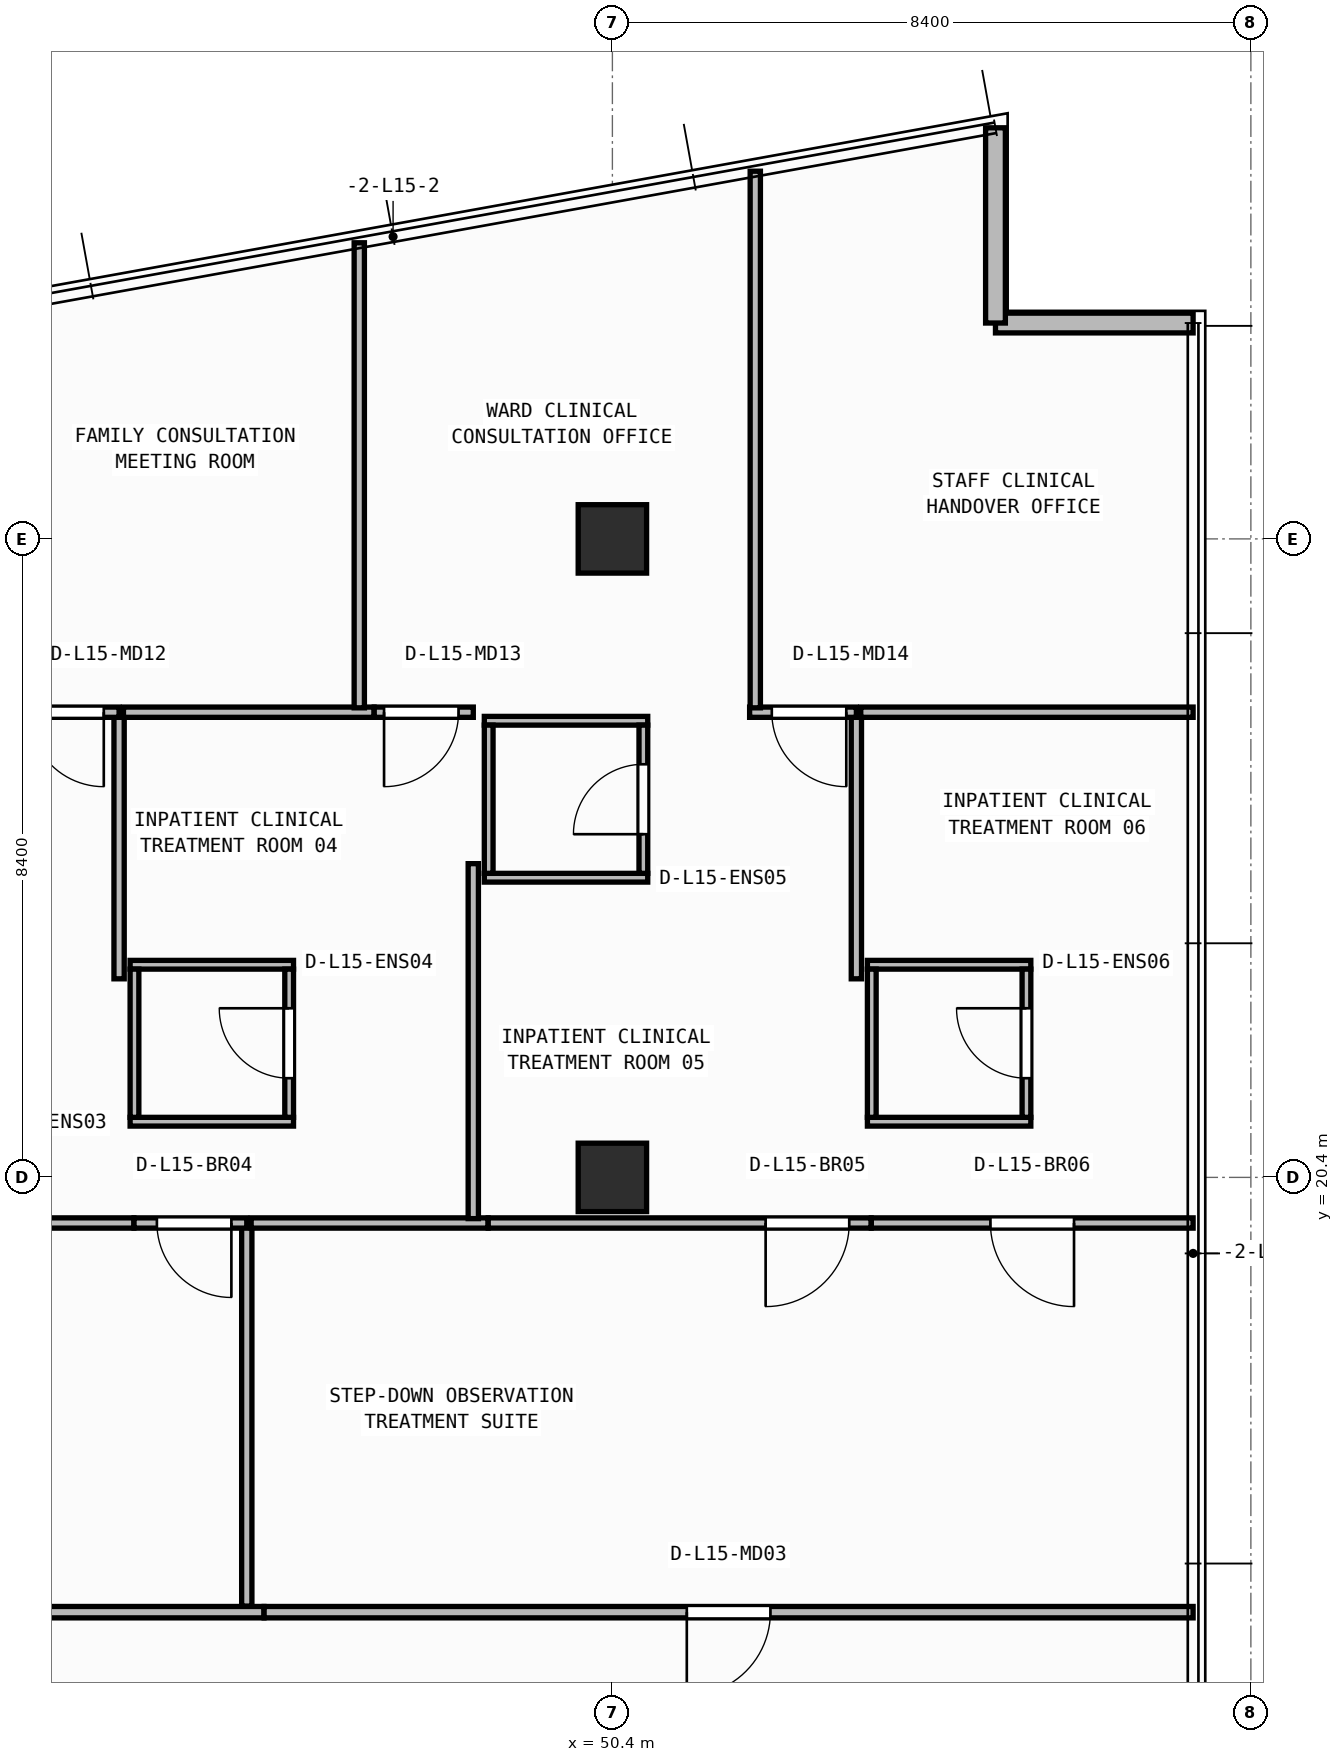
"""IFC4 building model, lengths in metres.
Left out: names, types, materials, properties, quantities, classifications, styles, units other than length and angle.
Written with IfcOpenShell. Run it as: python <this file> out.ifc"""

import sys

from ifc_helpers import new_model, si_unit, direction, frame, frame_2d, origin, origin_2d, place, context, subcontext, project, spatial, rectangle, extrude, element, fill, save


model = new_model("IFC4")
c1 = context("Model", 3, precision=1e-05, world=origin(), true_north=direction((0.0, 1.0)))
c2 = subcontext(c1, "Body", "Model", "MODEL_VIEW")
j1 = project(units=[si_unit("LENGTHUNIT", "METRE"), si_unit("PLANEANGLEUNIT", "RADIAN")], contexts=[c1])
p1 = place(None, origin())
s1 = spatial("IfcSite", under=j1, at=p1, CompositionType="ELEMENT")
p2 = place(p1, origin())
s2 = spatial("IfcBuilding", under=s1, at=p2, CompositionType="ELEMENT")
p3 = place(p2, frame((0.0, 0.0, 62.0)))
s3 = spatial("IfcBuildingStorey", under=s2, at=p3, CompositionType="ELEMENT", Elevation=62.0)
for number, where, z_axis, x_axis in (
    (1, (50.4, 20.4, 0.0), (0.0, 0.0, 1.0), (1.0, 0.0, 0.0)),
    (2, (50.4, 28.8, 0.0), (0.0, 0.0, 1.0), (1.0, 0.0, 0.0)),
):
    element("IfcColumn", number, at=place(p3, frame(where, z_axis=z_axis, x_axis=x_axis)), inside=s3, PredefinedType="COLUMN", context=c2, shape_type="SweptSolid", body=[
        extrude(rectangle(XDim=0.9, YDim=0.9, at=origin_2d()), origin(), (0.0, 0.0, 1.0), 3.95),
    ])
p4 = place(p3, frame((58.04, 31.64, 0.0), z_axis=(0.0, 0.0, 1.0), x_axis=(-1.0, 0.0, 0.0)))
e3 = element("IfcWall", 3, at=p4, inside=s3, PredefinedType="STANDARD", context=c2, shape_type="SweptSolid", body=[
    extrude(rectangle(XDim=2.6, YDim=0.26, at=frame_2d((1.3, 0.0))), origin(), (0.0, 0.0, 1.0), 3.71),
])
p5 = place(p3, frame((55.44, 31.64, 0.0), z_axis=(0.0, 0.0, 1.0), x_axis=(0.0, 1.0, 0.0)))
e4 = element("IfcWall", 4, at=p5, inside=s3, PredefinedType="STANDARD", context=c2, shape_type="SweptSolid", body=[
    extrude(rectangle(XDim=2.569, YDim=0.26, at=frame_2d((1.284, 0.0))), origin(), (0.0, 0.0, 1.0), 3.71),
])
for number, where, z_axis, x_axis in (
    (5, (44.055, 21.133, 0.0), (0.0, 0.0, 1.0), (1.0, 0.0, 0.0)),
    (6, (44.055, 23.198, 0.0), (0.0, 0.0, 1.0), (1.0, 0.0, 0.0)),
):
    element("IfcWall", number, at=place(p3, frame(where, z_axis=z_axis, x_axis=x_axis)), inside=s3, PredefinedType="PARTITIONING", context=c2, shape_type="SweptSolid", body=[
        extrude(rectangle(XDim=2.15, YDim=0.115, at=frame_2d((1.075, 0.0))), origin(), (0.0, 0.0, 1.0), 3.71),
    ])
p6 = place(p3, frame((44.113, 21.19, 0.0), z_axis=(0.0, 0.0, 1.0), x_axis=(0.0, 1.0, 0.0)))
e7 = element("IfcWall", 7, at=p6, inside=s3, PredefinedType="PARTITIONING", context=c2, shape_type="SweptSolid", body=[
    extrude(rectangle(XDim=1.95, YDim=0.115, at=frame_2d((0.975, 0.0))), origin(), (0.0, 0.0, 1.0), 3.71),
])
p7 = place(p3, frame((46.147, 21.19, 0.0), z_axis=(0.0, 0.0, 1.0), x_axis=(0.0, 1.0, 0.0)))
e8 = element("IfcWall", 8, at=p7, inside=s3, PredefinedType="PARTITIONING", context=c2, shape_type="SweptSolid", body=[
    extrude(rectangle(XDim=1.95, YDim=0.115, at=frame_2d((0.975, 0.0))), origin(), (0.0, 0.0, 1.0), 3.71),
])
p8 = place(p7, frame((0.515, 0.0, 0.0)))
e9 = element("IfcOpeningElement", 9, at=p8, cuts=e8, PredefinedType="OPENING", context=c2, shape_type="SweptSolid", body=[
    extrude(rectangle(XDim=0.92, YDim=2.1, at=frame_2d((0.46, 1.05))), frame((0.0, 0.067, 0.0), z_axis=(0.0, -1.0, 0.0), x_axis=(1.0, 0.0, 0.0)), (0.0, 0.0, 1.0), 0.135),
])
p9 = place(p3, frame((48.715, 24.343, 0.0), z_axis=(0.0, 0.0, 1.0), x_axis=(1.0, 0.0, 0.0)))
e10 = element("IfcWall", 10, at=p9, inside=s3, PredefinedType="PARTITIONING", context=c2, shape_type="SweptSolid", body=[
    extrude(rectangle(XDim=2.15, YDim=0.115, at=frame_2d((1.075, 0.0))), origin(), (0.0, 0.0, 1.0), 3.381),
])
p10 = place(p3, frame((48.715, 26.407, 0.0), z_axis=(0.0, 0.0, 1.0), x_axis=(1.0, 0.0, 0.0)))
e11 = element("IfcWall", 11, at=p10, inside=s3, PredefinedType="PARTITIONING", context=c2, shape_type="SweptSolid", body=[
    extrude(rectangle(XDim=2.15, YDim=0.115, at=frame_2d((1.075, 0.0))), origin(), (0.0, 0.0, 1.0), 3.71),
])
p11 = place(p3, frame((48.772, 24.4, 0.0), z_axis=(0.0, 0.0, 1.0), x_axis=(0.0, 1.0, 0.0)))
e12 = element("IfcWall", 12, at=p11, inside=s3, PredefinedType="PARTITIONING", context=c2, shape_type="SweptSolid", body=[
    extrude(rectangle(XDim=1.95, YDim=0.115, at=frame_2d((0.975, 0.0))), origin(), (0.0, 0.0, 1.0), 3.71),
])
p12 = place(p3, frame((50.808, 24.4, 0.0), z_axis=(0.0, 0.0, 1.0), x_axis=(0.0, 1.0, 0.0)))
e13 = element("IfcWall", 13, at=p12, inside=s3, PredefinedType="PARTITIONING", context=c2, shape_type="SweptSolid", body=[
    extrude(rectangle(XDim=1.95, YDim=0.115, at=frame_2d((0.975, 0.0))), origin(), (0.0, 0.0, 1.0), 3.073),
])
p13 = place(p12, frame((0.515, 0.0, 0.0)))
e14 = element("IfcOpeningElement", 14, at=p13, cuts=e13, PredefinedType="OPENING", context=c2, shape_type="SweptSolid", body=[
    extrude(rectangle(XDim=0.92, YDim=2.1, at=frame_2d((0.46, 1.05))), frame((0.0, 0.067, 0.0), z_axis=(0.0, -1.0, 0.0), x_axis=(1.0, 0.0, 0.0)), (0.0, 0.0, 1.0), 0.135),
])
for number, where, z_axis, x_axis in (
    (15, (53.755, 21.133, 0.0), (0.0, 0.0, 1.0), (1.0, 0.0, 0.0)),
    (16, (53.755, 23.198, 0.0), (0.0, 0.0, 1.0), (1.0, 0.0, 0.0)),
):
    element("IfcWall", number, at=place(p3, frame(where, z_axis=z_axis, x_axis=x_axis)), inside=s3, PredefinedType="PARTITIONING", context=c2, shape_type="SweptSolid", body=[
        extrude(rectangle(XDim=2.15, YDim=0.115, at=frame_2d((1.075, 0.0))), origin(), (0.0, 0.0, 1.0), 3.71),
    ])
p14 = place(p3, frame((53.812, 21.19, 0.0), z_axis=(0.0, 0.0, 1.0), x_axis=(0.0, 1.0, 0.0)))
e17 = element("IfcWall", 17, at=p14, inside=s3, PredefinedType="PARTITIONING", context=c2, shape_type="SweptSolid", body=[
    extrude(rectangle(XDim=1.95, YDim=0.115, at=frame_2d((0.975, 0.0))), origin(), (0.0, 0.0, 1.0), 3.71),
])
p15 = place(p3, frame((55.847, 21.19, 0.0), z_axis=(0.0, 0.0, 1.0), x_axis=(0.0, 1.0, 0.0)))
e18 = element("IfcWall", 18, at=p15, inside=s3, PredefinedType="PARTITIONING", context=c2, shape_type="SweptSolid", body=[
    extrude(rectangle(XDim=1.95, YDim=0.115, at=frame_2d((0.975, 0.0))), origin(), (0.0, 0.0, 1.0), 3.71),
])
p16 = place(p15, frame((0.515, 0.0, 0.0)))
e19 = element("IfcOpeningElement", 19, at=p16, cuts=e18, PredefinedType="OPENING", context=c2, shape_type="SweptSolid", body=[
    extrude(rectangle(XDim=0.92, YDim=2.1, at=frame_2d((0.46, 1.05))), frame((0.0, 0.067, 0.0), z_axis=(0.0, -1.0, 0.0), x_axis=(1.0, 0.0, 0.0)), (0.0, 0.0, 1.0), 0.135),
])
p17 = place(p3, frame((45.816, 14.68, 0.0), z_axis=(0.0, 0.0, 1.0), x_axis=(-1.0, 0.0, 0.0)))
e20 = element("IfcWall", 20, at=p17, inside=s3, PredefinedType="PARTITIONING", context=c2, shape_type="SweptSolid", body=[
    extrude(rectangle(XDim=16.062, YDim=0.15, at=frame_2d((8.031, 0.0))), origin(), (0.0, 0.0, 1.0), 3.71),
])
p18 = place(p17, frame((7.481, 0.0, 0.0)))
e21 = element("IfcOpeningElement", 21, at=p18, cuts=e20, PredefinedType="OPENING", context=c2, shape_type="SweptSolid", body=[
    extrude(rectangle(XDim=1.1, YDim=2.1, at=frame_2d((0.55, 1.05))), frame((0.0, 0.085, 0.0), z_axis=(0.0, -1.0, 0.0), x_axis=(1.0, 0.0, 0.0)), (0.0, 0.0, 1.0), 0.17),
])
p19 = place(p3, frame((58.04, 14.68, 0.0), z_axis=(0.0, 0.0, 1.0), x_axis=(-1.0, 0.0, 0.0)))
e22 = element("IfcWall", 22, at=p19, inside=s3, PredefinedType="PARTITIONING", context=c2, shape_type="SweptSolid", body=[
    extrude(rectangle(XDim=12.222, YDim=0.15, at=frame_2d((6.111, 0.0))), origin(), (0.0, 0.0, 1.0), 3.71),
])
p20 = place(p19, frame((5.561, 0.0, 0.0)))
e23 = element("IfcOpeningElement", 23, at=p20, cuts=e22, PredefinedType="OPENING", context=c2, shape_type="SweptSolid", body=[
    extrude(rectangle(XDim=1.1, YDim=2.1, at=frame_2d((0.55, 1.05))), frame((0.0, 0.085, 0.0), z_axis=(0.0, -1.0, 0.0), x_axis=(1.0, 0.0, 0.0)), (0.0, 0.0, 1.0), 0.17),
])
p21 = place(p3, frame((45.59, 14.76, 0.0), z_axis=(0.0, 0.0, 1.0), x_axis=(0.0, 1.0, 0.0)))
e24 = element("IfcWall", 24, at=p21, inside=s3, PredefinedType="PARTITIONING", context=c2, shape_type="SweptSolid", body=[
    extrude(rectangle(XDim=5.04, YDim=0.135, at=frame_2d((2.52, 0.0))), origin(), (0.0, 0.0, 1.0), 3.71),
])
p22 = place(p3, frame((44.104, 19.8, 0.0), z_axis=(0.0, 0.0, 1.0), x_axis=(-1.0, 0.0, 0.0)))
e25 = element("IfcWall", 25, at=p22, inside=s3, PredefinedType="PARTITIONING", context=c2, shape_type="SweptSolid", body=[
    extrude(rectangle(XDim=4.288, YDim=0.135, at=frame_2d((2.144, 0.0))), origin(), (0.0, 0.0, 1.0), 3.71),
])
p23 = place(p3, frame((45.59, 19.8, 0.0), z_axis=(0.0, 0.0, 1.0), x_axis=(-1.0, 0.0, 0.0)))
e26 = element("IfcWall", 26, at=p23, inside=s3, PredefinedType="PARTITIONING", context=c2, shape_type="SweptSolid", body=[
    extrude(rectangle(XDim=1.483, YDim=0.135, at=frame_2d((0.742, 0.0))), origin(), (0.0, 0.0, 1.0), 3.71),
])
p24 = place(p23, frame((0.203, 0.0, 0.0)))
e27 = element("IfcOpeningElement", 27, at=p24, cuts=e26, PredefinedType="OPENING", context=c2, shape_type="SweptSolid", body=[
    extrude(rectangle(XDim=0.98, YDim=2.1, at=frame_2d((0.49, 1.05))), frame((0.0, 0.077, 0.0), z_axis=(0.0, -1.0, 0.0), x_axis=(1.0, 0.0, 0.0)), (0.0, 0.0, 1.0), 0.155),
])
p25 = place(p3, frame((48.765, 19.8, 0.0), z_axis=(0.0, 0.0, 1.0), x_axis=(-1.0, 0.0, 0.0)))
e28 = element("IfcWall", 28, at=p25, inside=s3, PredefinedType="PARTITIONING", context=c2, shape_type="SweptSolid", body=[
    extrude(rectangle(XDim=3.117, YDim=0.135, at=frame_2d((1.559, 0.0))), origin(), (0.0, 0.0, 1.0), 3.71),
])
p26 = place(p3, frame((53.805, 19.8, 0.0), z_axis=(0.0, 0.0, 1.0), x_axis=(-1.0, 0.0, 0.0)))
e29 = element("IfcWall", 29, at=p26, inside=s3, PredefinedType="PARTITIONING", context=c2, shape_type="SweptSolid", body=[
    extrude(rectangle(XDim=5.038, YDim=0.135, at=frame_2d((2.519, 0.0))), origin(), (0.0, 0.0, 1.0), 3.71),
])
p27 = place(p26, frame((0.289, 0.0, 0.0)))
e30 = element("IfcOpeningElement", 30, at=p27, cuts=e29, PredefinedType="OPENING", context=c2, shape_type="SweptSolid", body=[
    extrude(rectangle(XDim=1.1, YDim=2.1, at=frame_2d((0.55, 1.05))), frame((0.0, 0.077, 0.0), z_axis=(0.0, -1.0, 0.0), x_axis=(1.0, 0.0, 0.0)), (0.0, 0.0, 1.0), 0.155),
])
p28 = place(p3, frame((58.04, 19.8, 0.0), z_axis=(0.0, 0.0, 1.0), x_axis=(-1.0, 0.0, 0.0)))
e31 = element("IfcWall", 31, at=p28, inside=s3, PredefinedType="PARTITIONING", context=c2, shape_type="SweptSolid", body=[
    extrude(rectangle(XDim=4.233, YDim=0.135, at=frame_2d((2.117, 0.0))), origin(), (0.0, 0.0, 1.0), 3.71),
])
p29 = place(p28, frame((1.567, 0.0, 0.0)))
e32 = element("IfcOpeningElement", 32, at=p29, cuts=e31, PredefinedType="OPENING", context=c2, shape_type="SweptSolid", body=[
    extrude(rectangle(XDim=1.1, YDim=2.1, at=frame_2d((0.55, 1.05))), frame((0.0, 0.077, 0.0), z_axis=(0.0, -1.0, 0.0), x_axis=(1.0, 0.0, 0.0)), (0.0, 0.0, 1.0), 0.155),
])
p30 = place(p3, frame((43.91, 23.012, 0.0), z_axis=(0.0, 0.0, 1.0), x_axis=(0.0, 1.0, 0.0)))
e33 = element("IfcWall", 33, at=p30, inside=s3, PredefinedType="PARTITIONING", context=c2, shape_type="SweptSolid", body=[
    extrude(rectangle(XDim=3.508, YDim=0.135, at=frame_2d((1.754, 0.0))), origin(), (0.0, 0.0, 1.0), 3.71),
])
p31 = place(p3, frame((43.91, 26.52, 0.0), z_axis=(0.0, 0.0, 1.0), x_axis=(-1.0, 0.0, 0.0)))
e34 = element("IfcWall", 34, at=p31, inside=s3, PredefinedType="PARTITIONING", context=c2, shape_type="SweptSolid", body=[
    extrude(rectangle(XDim=1.433, YDim=0.135, at=frame_2d((0.717, 0.0))), origin(), (0.0, 0.0, 1.0), 3.71),
])
p32 = place(p31, frame((0.201, 0.0, 0.0)))
e35 = element("IfcOpeningElement", 35, at=p32, cuts=e34, PredefinedType="OPENING", context=c2, shape_type="SweptSolid", body=[
    extrude(rectangle(XDim=0.98, YDim=2.1, at=frame_2d((0.49, 1.05))), frame((0.0, 0.077, 0.0), z_axis=(0.0, -1.0, 0.0), x_axis=(1.0, 0.0, 0.0)), (0.0, 0.0, 1.0), 0.155),
])
p33 = place(p3, frame((48.57, 19.857, 0.0), z_axis=(0.0, 0.0, 1.0), x_axis=(0.0, 1.0, 0.0)))
e36 = element("IfcWall", 36, at=p33, inside=s3, PredefinedType="PARTITIONING", context=c2, shape_type="SweptSolid", body=[
    extrude(rectangle(XDim=4.67, YDim=0.135, at=frame_2d((2.335, 0.0))), origin(), (0.0, 0.0, 1.0), 3.71),
])
p34 = place(p3, frame((47.265, 26.52, 0.0), z_axis=(0.0, 0.0, 1.0), x_axis=(-1.0, 0.0, 0.0)))
e37 = element("IfcWall", 37, at=p34, inside=s3, PredefinedType="PARTITIONING", context=c2, shape_type="SweptSolid", body=[
    extrude(rectangle(XDim=3.297, YDim=0.135, at=frame_2d((1.648, 0.0))), origin(), (0.0, 0.0, 1.0), 3.71),
])
p35 = place(p3, frame((48.57, 26.52, 0.0), z_axis=(0.0, 0.0, 1.0), x_axis=(-1.0, 0.0, 0.0)))
e38 = element("IfcWall", 38, at=p35, inside=s3, PredefinedType="PARTITIONING", context=c2, shape_type="SweptSolid", body=[
    extrude(rectangle(XDim=1.303, YDim=0.135, at=frame_2d((0.652, 0.0))), origin(), (0.0, 0.0, 1.0), 3.71),
])
p36 = place(p35, frame((0.194, 0.0, 0.0)))
e39 = element("IfcOpeningElement", 39, at=p36, cuts=e38, PredefinedType="OPENING", context=c2, shape_type="SweptSolid", body=[
    extrude(rectangle(XDim=0.98, YDim=2.1, at=frame_2d((0.49, 1.05))), frame((0.0, 0.077, 0.0), z_axis=(0.0, -1.0, 0.0), x_axis=(1.0, 0.0, 0.0)), (0.0, 0.0, 1.0), 0.155),
])
p37 = place(p3, frame((53.61, 23.012, 0.0), z_axis=(0.0, 0.0, 1.0), x_axis=(0.0, 1.0, 0.0)))
e40 = element("IfcWall", 40, at=p37, inside=s3, PredefinedType="PARTITIONING", context=c2, shape_type="SweptSolid", body=[
    extrude(rectangle(XDim=3.508, YDim=0.135, at=frame_2d((1.754, 0.0))), origin(), (0.0, 0.0, 1.0), 3.71),
])
p38 = place(p3, frame((53.61, 26.52, 0.0), z_axis=(0.0, 0.0, 1.0), x_axis=(-1.0, 0.0, 0.0)))
e41 = element("IfcWall", 41, at=p38, inside=s3, PredefinedType="PARTITIONING", context=c2, shape_type="SweptSolid", body=[
    extrude(rectangle(XDim=1.405, YDim=0.135, at=frame_2d((0.702, 0.0))), origin(), (0.0, 0.0, 1.0), 3.71),
])
p39 = place(p38, frame((0.133, 0.0, 0.0)))
e42 = element("IfcOpeningElement", 42, at=p39, cuts=e41, PredefinedType="OPENING", context=c2, shape_type="SweptSolid", body=[
    extrude(rectangle(XDim=0.98, YDim=2.1, at=frame_2d((0.49, 1.05))), frame((0.0, 0.077, 0.0), z_axis=(0.0, -1.0, 0.0), x_axis=(1.0, 0.0, 0.0)), (0.0, 0.0, 1.0), 0.155),
])
p40 = place(p3, frame((58.04, 26.52, 0.0), z_axis=(0.0, 0.0, 1.0), x_axis=(-1.0, 0.0, 0.0)))
e43 = element("IfcWall", 43, at=p40, inside=s3, PredefinedType="PARTITIONING", context=c2, shape_type="SweptSolid", body=[
    extrude(rectangle(XDim=4.373, YDim=0.135, at=frame_2d((2.186, 0.0))), origin(), (0.0, 0.0, 1.0), 3.71),
])
p41 = place(p3, frame((47.07, 26.577, 0.0), z_axis=(0.0, 0.0, 1.0), x_axis=(0.0, 1.0, 0.0)))
e44 = element("IfcWall", 44, at=p41, inside=s3, PredefinedType="PARTITIONING", context=c2, shape_type="SweptSolid", body=[
    extrude(rectangle(XDim=6.118, YDim=0.135, at=frame_2d((3.059, 0.0))), origin(), (0.0, 0.0, 1.0), 3.71),
])
p42 = place(p3, frame((52.28, 26.577, 0.0), z_axis=(0.0, 0.0, 1.0), x_axis=(0.0, 1.0, 0.0)))
e45 = element("IfcWall", 45, at=p42, inside=s3, PredefinedType="PARTITIONING", context=c2, shape_type="SweptSolid", body=[
    extrude(rectangle(XDim=7.06, YDim=0.135, at=frame_2d((3.53, 0.0))), origin(), (0.0, 0.0, 1.0), 3.71),
])
p43 = place(p8, origin())
e46 = element("IfcDoor", 46, at=p43, inside=s3, OperationType="SINGLE_SWING_RIGHT", PredefinedType="DOOR", context=c2, shape_type="SweptSolid", body=[
    extrude(rectangle(XDim=0.92, YDim=2.1, at=frame_2d((0.46, 1.05))), frame((0.0, 0.025, 0.0), z_axis=(0.0, -1.0, 0.0), x_axis=(1.0, 0.0, 0.0)), (0.0, 0.0, 1.0), 0.05),
])
fill(e9, e46)
p44 = place(p13, origin())
e47 = element("IfcDoor", 47, at=p44, inside=s3, OperationType="SINGLE_SWING_LEFT", PredefinedType="DOOR", context=c2, shape_type="SweptSolid", body=[
    extrude(rectangle(XDim=0.92, YDim=2.1, at=frame_2d((0.46, 1.05))), frame((0.0, 0.025, 0.0), z_axis=(0.0, -1.0, 0.0), x_axis=(1.0, 0.0, 0.0)), (0.0, 0.0, 1.0), 0.05),
])
fill(e14, e47)
p45 = place(p16, origin())
e48 = element("IfcDoor", 48, at=p45, inside=s3, OperationType="SINGLE_SWING_RIGHT", PredefinedType="DOOR", context=c2, shape_type="SweptSolid", body=[
    extrude(rectangle(XDim=0.92, YDim=2.1, at=frame_2d((0.46, 1.05))), frame((0.0, 0.025, 0.0), z_axis=(0.0, -1.0, 0.0), x_axis=(1.0, 0.0, 0.0)), (0.0, 0.0, 1.0), 0.05),
])
fill(e19, e48)
p46 = place(p20, origin())
e49 = element("IfcDoor", 49, at=p46, inside=s3, OperationType="SINGLE_SWING_RIGHT", PredefinedType="DOOR", context=c2, shape_type="SweptSolid", body=[
    extrude(rectangle(XDim=1.1, YDim=2.1, at=frame_2d((0.55, 1.05))), frame((0.0, 0.025, 0.0), z_axis=(0.0, -1.0, 0.0), x_axis=(1.0, 0.0, 0.0)), (0.0, 0.0, 1.0), 0.05),
])
fill(e23, e49)
p47 = place(p24, origin())
e50 = element("IfcDoor", 50, at=p47, inside=s3, OperationType="SINGLE_SWING_LEFT", PredefinedType="DOOR", context=c2, shape_type="SweptSolid", body=[
    extrude(rectangle(XDim=0.98, YDim=2.1, at=frame_2d((0.49, 1.05))), frame((0.0, 0.025, 0.0), z_axis=(0.0, -1.0, 0.0), x_axis=(1.0, 0.0, 0.0)), (0.0, 0.0, 1.0), 0.05),
])
fill(e27, e50)
p48 = place(p27, origin())
e51 = element("IfcDoor", 51, at=p48, inside=s3, OperationType="SINGLE_SWING_RIGHT", PredefinedType="DOOR", context=c2, shape_type="SweptSolid", body=[
    extrude(rectangle(XDim=1.1, YDim=2.1, at=frame_2d((0.55, 1.05))), frame((0.0, 0.025, 0.0), z_axis=(0.0, -1.0, 0.0), x_axis=(1.0, 0.0, 0.0)), (0.0, 0.0, 1.0), 0.05),
])
fill(e30, e51)
p49 = place(p29, origin())
e52 = element("IfcDoor", 52, at=p49, inside=s3, OperationType="SINGLE_SWING_LEFT", PredefinedType="DOOR", context=c2, shape_type="SweptSolid", body=[
    extrude(rectangle(XDim=1.1, YDim=2.1, at=frame_2d((0.55, 1.05))), frame((0.0, 0.025, 0.0), z_axis=(0.0, -1.0, 0.0), x_axis=(1.0, 0.0, 0.0)), (0.0, 0.0, 1.0), 0.05),
])
fill(e32, e52)
p50 = place(p32, origin())
e53 = element("IfcDoor", 53, at=p50, inside=s3, OperationType="SINGLE_SWING_LEFT", PredefinedType="DOOR", context=c2, shape_type="SweptSolid", body=[
    extrude(rectangle(XDim=0.98, YDim=2.1, at=frame_2d((0.49, 1.05))), frame((0.0, 0.025, 0.0), z_axis=(0.0, -1.0, 0.0), x_axis=(1.0, 0.0, 0.0)), (0.0, 0.0, 1.0), 0.05),
])
fill(e35, e53)
p51 = place(p36, origin())
e54 = element("IfcDoor", 54, at=p51, inside=s3, OperationType="SINGLE_SWING_RIGHT", PredefinedType="DOOR", context=c2, shape_type="SweptSolid", body=[
    extrude(rectangle(XDim=0.98, YDim=2.1, at=frame_2d((0.49, 1.05))), frame((0.0, 0.025, 0.0), z_axis=(0.0, -1.0, 0.0), x_axis=(1.0, 0.0, 0.0)), (0.0, 0.0, 1.0), 0.05),
])
fill(e39, e54)
p52 = place(p39, origin())
e55 = element("IfcDoor", 55, at=p52, inside=s3, OperationType="SINGLE_SWING_LEFT", PredefinedType="DOOR", context=c2, shape_type="SweptSolid", body=[
    extrude(rectangle(XDim=0.98, YDim=2.1, at=frame_2d((0.49, 1.05))), frame((0.0, 0.025, 0.0), z_axis=(0.0, -1.0, 0.0), x_axis=(1.0, 0.0, 0.0)), (0.0, 0.0, 1.0), 0.05),
])
fill(e42, e55)
save(model, sys.argv[1])
